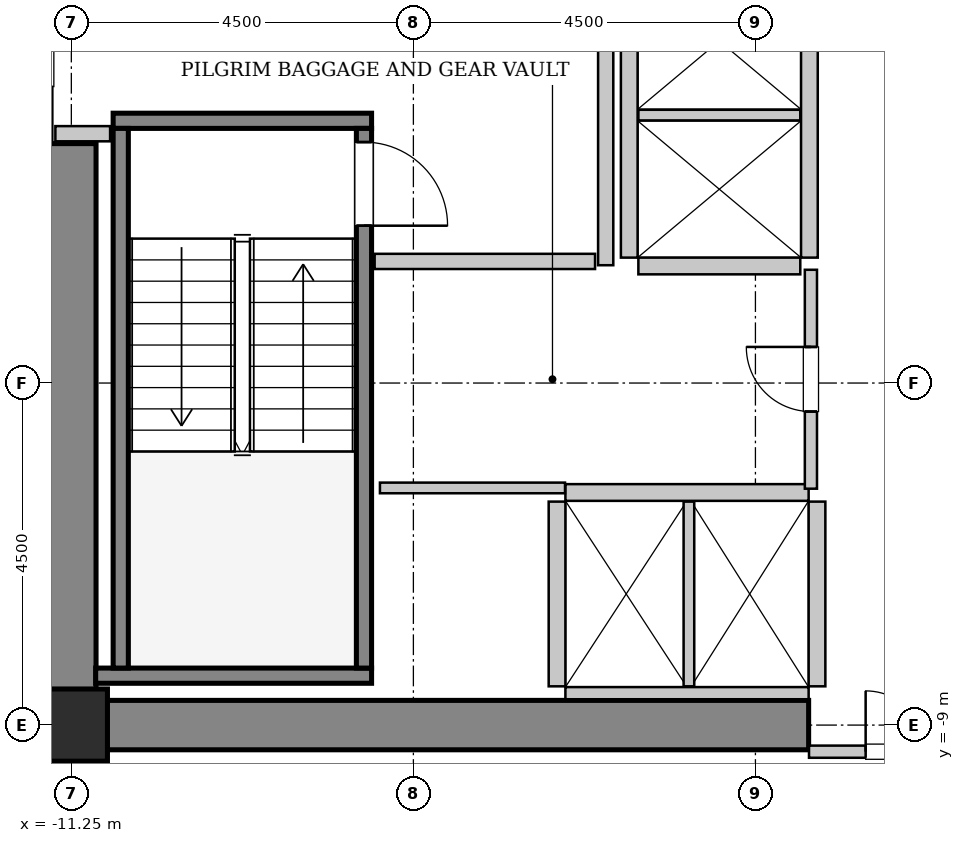
"""IFC4 building model, lengths in metres.
Left out: names, types, materials, properties, quantities, classifications, styles, units other than length and angle.
Written with IfcOpenShell. Run it as: python <this file> out.ifc"""

import sys

from ifc_helpers import new_model, si_unit, direction, frame, frame_2d, origin, origin_2d, place, context, subcontext, project, spatial, rectangle, hollow_rectangle, extrude, source, transform, mapped, element, fill, save


model = new_model("IFC4")
c1 = context("Model", 3, precision=1e-05, world=origin(), true_north=direction((0.0, 1.0)))
c2 = subcontext(c1, "Body", "Model", "MODEL_VIEW")
j1 = project(units=[si_unit("LENGTHUNIT", "METRE"), si_unit("PLANEANGLEUNIT", "RADIAN")], contexts=[c1])
p1 = place(None, origin())
s1 = spatial("IfcSite", under=j1, at=p1, CompositionType="ELEMENT")
p2 = place(p1, origin())
s2 = spatial("IfcBuilding", under=s1, at=p2, CompositionType="ELEMENT")
p3 = place(p2, frame((0.0, 0.0, 63.4)))
s3 = spatial("IfcBuildingStorey", under=s2, at=p3, CompositionType="ELEMENT", Elevation=63.4)
m1 = source(origin(), c2, "Body", "SweptSolid", [
    extrude(rectangle(XDim=10.025, YDim=0.65, at=frame_2d((5.012, 0.0))), origin(), (0.0, 0.0, 1.0), 3.8),
])
p4 = place(p3, frame((-11.575, -9.0, 0.0), z_axis=(0.0, 0.0, 1.0), x_axis=(1.0, 0.0, 0.0)))
e1 = element("IfcWall", 1, at=p4, inside=s3, PredefinedType="SHEAR", context=c2, shape_type="MappedRepresentation", body=[
    mapped(m1, transform((0.0, 0.0, 0.0), x_axis=(1.0, 0.0, 0.0), y_axis=(0.0, 1.0, 0.0), z_axis=(0.0, 0.0, 1.0), scale=1.0)),
])
m2 = source(origin(), c2, "Body", "SweptSolid", [
    extrude(rectangle(XDim=7.325, YDim=0.65, at=frame_2d((3.663, 0.0))), origin(), (0.0, 0.0, 1.0), 3.8),
])
p5 = place(p3, frame((-11.25, -8.675, 0.0), z_axis=(0.0, 0.0, 1.0), x_axis=(0.0, 1.0, 0.0)))
e2 = element("IfcWall", 2, at=p5, inside=s3, PredefinedType="SHEAR", context=c2, shape_type="MappedRepresentation", body=[
    mapped(m2, transform((0.0, 0.0, 0.0), x_axis=(1.0, 0.0, 0.0), y_axis=(0.0, 1.0, 0.0), z_axis=(0.0, 0.0, 1.0), scale=1.0)),
])
m3 = source(origin(), c2, "Body", "SweptSolid", [
    extrude(hollow_rectangle(XDim=0.95, YDim=0.95, WallThickness=0.045, InnerFilletRadius=0.045, OuterFilletRadius=0.09, at=origin_2d()), origin(), (0.0, 0.0, 1.0), 3.8),
])
p6 = place(p3, frame((-11.25, -9.0, 0.0), z_axis=(0.0, 0.0, 1.0), x_axis=(1.0, 0.0, 0.0)))
e3 = element("IfcColumn", 3, at=p6, inside=s3, PredefinedType="COLUMN", context=c2, shape_type="MappedRepresentation", body=[
    mapped(m3, transform((0.0, 0.0, 0.0), x_axis=(1.0, 0.0, 0.0), y_axis=(0.0, 1.0, 0.0), z_axis=(0.0, 0.0, 1.0), scale=1.0)),
])
m4 = source(origin(), c2, "Body", "SweptSolid", [
    extrude(rectangle(XDim=3.4, YDim=0.2, at=frame_2d((1.7, 0.0))), origin(), (0.0, 0.0, 1.0), 3.8),
])
p7 = place(p3, frame((-10.7, -1.05, 0.0), z_axis=(0.0, 0.0, 1.0), x_axis=(1.0, 0.0, 0.0)))
e4 = element("IfcWall", 4, at=p7, inside=s3, PredefinedType="SOLIDWALL", context=c2, shape_type="MappedRepresentation", body=[
    mapped(m4, transform((0.0, 0.0, 0.0), x_axis=(1.0, 0.0, 0.0), y_axis=(0.0, 1.0, 0.0), z_axis=(0.0, 0.0, 1.0), scale=1.0)),
])
m5 = source(origin(), c2, "Body", "SweptSolid", [
    extrude(rectangle(XDim=3.63, YDim=0.2, at=frame_2d((1.815, 0.0))), origin(), (0.0, 0.0, 1.0), 3.8),
])
p8 = place(p3, frame((-10.93, -8.35, 0.0), z_axis=(0.0, 0.0, 1.0), x_axis=(1.0, 0.0, 0.0)))
e5 = element("IfcWall", 5, at=p8, inside=s3, PredefinedType="SOLIDWALL", context=c2, shape_type="MappedRepresentation", body=[
    mapped(m5, transform((0.0, 0.0, 0.0), x_axis=(1.0, 0.0, 0.0), y_axis=(0.0, 1.0, 0.0), z_axis=(0.0, 0.0, 1.0), scale=1.0)),
])
m6 = source(origin(), c2, "Body", "SweptSolid", [
    extrude(rectangle(XDim=7.1, YDim=0.2, at=frame_2d((3.55, 0.0))), origin(), (0.0, 0.0, 1.0), 3.8),
])
p9 = place(p3, frame((-10.6, -1.15, 0.0), z_axis=(0.0, 0.0, 1.0), x_axis=(0.0, -1.0, 0.0)))
e6 = element("IfcWall", 6, at=p9, inside=s3, PredefinedType="SOLIDWALL", context=c2, shape_type="MappedRepresentation", body=[
    mapped(m6, transform((0.0, 0.0, 0.0), x_axis=(1.0, 0.0, 0.0), y_axis=(0.0, 1.0, 0.0), z_axis=(0.0, 0.0, 1.0), scale=1.0)),
])
p10 = place(p3, frame((-7.4, -1.15, 0.0), z_axis=(0.0, 0.0, 1.0), x_axis=(0.0, -1.0, 0.0)))
e7 = element("IfcWall", 7, at=p10, inside=s3, PredefinedType="SOLIDWALL", context=c2, shape_type="MappedRepresentation", body=[
    mapped(m6, transform((0.0, 0.0, 0.0), x_axis=(1.0, 0.0, 0.0), y_axis=(0.0, 1.0, 0.0), z_axis=(0.0, 0.0, 1.0), scale=1.0)),
])
p11 = place(p10, frame((0.18, 0.0, 0.0)))
e8 = element("IfcOpeningElement", 8, at=p11, cuts=e7, PredefinedType="OPENING", context=c2, shape_type="SweptSolid", body=[
    extrude(rectangle(XDim=1.1, YDim=2.15, at=frame_2d((0.55, 1.075))), frame((0.0, 0.11, 0.0), z_axis=(0.0, -1.0, 0.0), x_axis=(1.0, 0.0, 0.0)), (0.0, 0.0, 1.0), 0.22),
])
m7 = source(origin(), c2, "Body", "SweptSolid", [
    extrude(rectangle(XDim=3.2, YDim=0.22, at=frame_2d((1.6, 0.0))), origin(), (0.0, 0.0, 1.0), 3.535),
])
p12 = place(p3, frame((-1.55, -5.94, 0.0), z_axis=(0.0, 0.0, 1.0), x_axis=(-1.0, 0.0, 0.0)))
e9 = element("IfcWall", 9, at=p12, inside=s3, PredefinedType="SOLIDWALL", context=c2, shape_type="MappedRepresentation", body=[
    mapped(m7, transform((0.0, 0.0, 0.0), x_axis=(1.0, 0.0, 0.0), y_axis=(0.0, 1.0, 0.0), z_axis=(0.0, 0.0, 1.0), scale=1.0)),
])
m8 = source(origin(), c2, "Body", "SweptSolid", [
    extrude(rectangle(XDim=3.2, YDim=0.16, at=frame_2d((1.6, 0.0))), origin(), (0.0, 0.0, 1.0), 2.425),
])
p13 = place(p3, frame((-4.75, -8.58, 0.0), z_axis=(0.0, 0.0, 1.0), x_axis=(1.0, 0.0, 0.0)))
e10 = element("IfcWall", 10, at=p13, inside=s3, PredefinedType="PARTITIONING", context=c2, shape_type="MappedRepresentation", body=[
    mapped(m8, transform((0.0, 0.0, 0.0), x_axis=(1.0, 0.0, 0.0), y_axis=(0.0, 1.0, 0.0), z_axis=(0.0, 0.0, 1.0), scale=1.0)),
])
m9 = source(origin(), c2, "Body", "SweptSolid", [
    extrude(rectangle(XDim=2.43, YDim=0.22, at=frame_2d((1.215, 0.0))), origin(), (0.0, 0.0, 1.0), 3.535),
])
p14 = place(p3, frame((-4.86, -6.06, 0.0), z_axis=(0.0, 0.0, 1.0), x_axis=(0.0, -1.0, 0.0)))
e11 = element("IfcWall", 11, at=p14, inside=s3, PredefinedType="SOLIDWALL", context=c2, shape_type="MappedRepresentation", body=[
    mapped(m9, transform((0.0, 0.0, 0.0), x_axis=(1.0, 0.0, 0.0), y_axis=(0.0, 1.0, 0.0), z_axis=(0.0, 0.0, 1.0), scale=1.0)),
])
m10 = source(origin(), c2, "Body", "SweptSolid", [
    extrude(rectangle(XDim=2.43, YDim=0.14, at=frame_2d((1.215, 0.0))), origin(), (0.0, 0.0, 1.0), 3.535),
])
p15 = place(p3, frame((-3.125, -8.49, 0.0), z_axis=(0.0, 0.0, 1.0), x_axis=(0.0, 1.0, 0.0)))
e12 = element("IfcWall", 12, at=p15, inside=s3, PredefinedType="PARTITIONING", context=c2, shape_type="MappedRepresentation", body=[
    mapped(m10, transform((0.0, 0.0, 0.0), x_axis=(1.0, 0.0, 0.0), y_axis=(0.0, 1.0, 0.0), z_axis=(0.0, 0.0, 1.0), scale=1.0)),
])
p16 = place(p3, frame((-1.44, -8.49, 0.0), z_axis=(0.0, 0.0, 1.0), x_axis=(0.0, 1.0, 0.0)))
e13 = element("IfcWall", 13, at=p16, inside=s3, PredefinedType="SOLIDWALL", context=c2, shape_type="MappedRepresentation", body=[
    mapped(m9, transform((0.0, 0.0, 0.0), x_axis=(1.0, 0.0, 0.0), y_axis=(0.0, 1.0, 0.0), z_axis=(0.0, 0.0, 1.0), scale=1.0)),
])
m11 = source(origin(), c2, "Body", "SweptSolid", [
    extrude(rectangle(XDim=5.7, YDim=0.22, at=frame_2d((2.85, 0.0))), origin(), (0.0, 0.0, 1.0), 3.535),
])
for number, where, z_axis, x_axis in (
    (14, (-1.54, -2.85, 0.0), (0.0, 0.0, 1.0), (0.0, 1.0, 0.0)),
    (15, (-3.91, 2.85, 0.0), (0.0, 0.0, 1.0), (0.0, -1.0, 0.0)),
):
    element("IfcWall", number, at=place(p3, frame(where, z_axis=z_axis, x_axis=x_axis)), inside=s3, PredefinedType="SOLIDWALL", context=c2, shape_type="MappedRepresentation", body=[
        mapped(m11, transform((0.0, 0.0, 0.0), x_axis=(1.0, 0.0, 0.0), y_axis=(0.0, 1.0, 0.0), z_axis=(0.0, 0.0, 1.0), scale=1.0)),
    ])
m12 = source(origin(), c2, "Body", "SweptSolid", [
    extrude(rectangle(XDim=2.13, YDim=0.22, at=frame_2d((1.065, 0.0))), origin(), (0.0, 0.0, 1.0), 3.535),
])
p17 = place(p3, frame((-3.79, -2.96, 0.0), z_axis=(0.0, 0.0, 1.0), x_axis=(1.0, 0.0, 0.0)))
e16 = element("IfcWall", 16, at=p17, inside=s3, PredefinedType="SOLIDWALL", context=c2, shape_type="MappedRepresentation", body=[
    mapped(m12, transform((0.0, 0.0, 0.0), x_axis=(1.0, 0.0, 0.0), y_axis=(0.0, 1.0, 0.0), z_axis=(0.0, 0.0, 1.0), scale=1.0)),
])
m13 = source(origin(), c2, "Body", "SweptSolid", [
    extrude(rectangle(XDim=2.13, YDim=0.14, at=frame_2d((1.065, 0.0))), origin(), (0.0, 0.0, 1.0), 3.535),
])
p18 = place(p3, frame((-3.79, -0.975, 0.0), z_axis=(0.0, 0.0, 1.0), x_axis=(1.0, 0.0, 0.0)))
e17 = element("IfcWall", 17, at=p18, inside=s3, PredefinedType="PARTITIONING", context=c2, shape_type="MappedRepresentation", body=[
    mapped(m13, transform((0.0, 0.0, 0.0), x_axis=(1.0, 0.0, 0.0), y_axis=(0.0, 1.0, 0.0), z_axis=(0.0, 0.0, 1.0), scale=1.0)),
])
m14 = source(origin(), c2, "Body", "SweptSolid", [
    extrude(rectangle(XDim=5.9, YDim=0.2, at=frame_2d((2.95, 0.0))), origin(), (0.0, 0.0, 1.0), 3.535),
])
p19 = place(p3, frame((-4.22, -2.95, 0.0), z_axis=(0.0, 0.0, 1.0), x_axis=(0.0, 1.0, 0.0)))
e18 = element("IfcWall", 18, at=p19, inside=s3, PredefinedType="PARTITIONING", context=c2, shape_type="MappedRepresentation", body=[
    mapped(m14, transform((0.0, 0.0, 0.0), x_axis=(1.0, 0.0, 0.0), y_axis=(0.0, 1.0, 0.0), z_axis=(0.0, 0.0, 1.0), scale=1.0)),
])
m15 = source(origin(), c2, "Body", "SweptSolid", [
    extrude(rectangle(XDim=2.9, YDim=0.2, at=frame_2d((1.45, 0.0))), origin(), (0.0, 0.0, 1.0), 3.535),
])
p20 = place(p3, frame((-7.26, -2.9, 0.0), z_axis=(0.0, 0.0, 1.0), x_axis=(1.0, 0.0, 0.0)))
e19 = element("IfcWall", 19, at=p20, inside=s3, PredefinedType="PARTITIONING", context=c2, shape_type="MappedRepresentation", body=[
    mapped(m15, transform((0.0, 0.0, 0.0), x_axis=(1.0, 0.0, 0.0), y_axis=(0.0, 1.0, 0.0), z_axis=(0.0, 0.0, 1.0), scale=1.0)),
])
m16 = source(origin(), c2, "Body", "SweptSolid", [
    extrude(rectangle(XDim=0.72, YDim=0.2, at=frame_2d((0.36, 0.0))), origin(), (0.0, 0.0, 1.0), 3.535),
])
p21 = place(p3, frame((-11.46, -1.22, 0.0), z_axis=(0.0, 0.0, 1.0), x_axis=(1.0, 0.0, 0.0)))
e20 = element("IfcWall", 20, at=p21, inside=s3, PredefinedType="PARTITIONING", context=c2, shape_type="MappedRepresentation", body=[
    mapped(m16, transform((0.0, 0.0, 0.0), x_axis=(1.0, 0.0, 0.0), y_axis=(0.0, 1.0, 0.0), z_axis=(0.0, 0.0, 1.0), scale=1.0)),
])
m17 = source(origin(), c2, "Body", "SweptSolid", [
    extrude(rectangle(XDim=3.09, YDim=0.16, at=frame_2d((1.545, 0.0))), origin(), (0.0, 0.0, 1.0), 2.425),
])
p22 = place(p3, frame((-1.545, -9.35, 0.0), z_axis=(0.0, 0.0, 1.0), x_axis=(1.0, 0.0, 0.0)))
e21 = element("IfcWall", 21, at=p22, inside=s3, PredefinedType="PARTITIONING", context=c2, shape_type="MappedRepresentation", body=[
    mapped(m17, transform((0.0, 0.0, 0.0), x_axis=(1.0, 0.0, 0.0), y_axis=(0.0, 1.0, 0.0), z_axis=(0.0, 0.0, 1.0), scale=1.0)),
])
p23 = place(p22, frame((0.745, 0.0, 0.0)))
e22 = element("IfcOpeningElement", 22, at=p23, cuts=e21, PredefinedType="OPENING", context=c2, shape_type="SweptSolid", body=[
    extrude(rectangle(XDim=1.6, YDim=2.3, at=frame_2d((0.8, 1.15))), frame((0.0, 0.09, 0.0), z_axis=(0.0, -1.0, 0.0), x_axis=(1.0, 0.0, 0.0)), (0.0, 0.0, 1.0), 0.18),
])
m18 = source(origin(), c2, "Body", "SweptSolid", [
    extrude(rectangle(XDim=2.88, YDim=0.16, at=frame_2d((1.44, 0.0))), origin(), (0.0, 0.0, 1.0), 3.535),
])
p24 = place(p3, frame((-1.52, -5.89, 0.0), z_axis=(0.0, 0.0, 1.0), x_axis=(0.0, 1.0, 0.0)))
e23 = element("IfcWall", 23, at=p24, inside=s3, PredefinedType="PARTITIONING", context=c2, shape_type="MappedRepresentation", body=[
    mapped(m18, transform((0.0, 0.0, 0.0), x_axis=(1.0, 0.0, 0.0), y_axis=(0.0, 1.0, 0.0), z_axis=(0.0, 0.0, 1.0), scale=1.0)),
])
p25 = place(p24, frame((1.015, 0.0, 0.0)))
e24 = element("IfcOpeningElement", 24, at=p25, cuts=e23, PredefinedType="OPENING", context=c2, shape_type="SweptSolid", body=[
    extrude(rectangle(XDim=0.85, YDim=2.1, at=frame_2d((0.425, 1.05))), frame((0.0, 0.09, 0.0), z_axis=(0.0, -1.0, 0.0), x_axis=(1.0, 0.0, 0.0)), (0.0, 0.0, 1.0), 0.18),
])
m19 = source(origin(), c2, "Body", "SweptSolid", [
    extrude(rectangle(XDim=2.435, YDim=0.14, at=frame_2d((1.218, 0.0))), origin(), (0.0, 0.0, 1.0), 3.535),
])
p26 = place(p3, frame((-7.19, -5.88, 0.0), z_axis=(0.0, 0.0, 1.0), x_axis=(1.0, 0.0, 0.0)))
e25 = element("IfcWall", 25, at=p26, inside=s3, PredefinedType="PARTITIONING", context=c2, shape_type="MappedRepresentation", body=[
    mapped(m19, transform((0.0, 0.0, 0.0), x_axis=(1.0, 0.0, 0.0), y_axis=(0.0, 1.0, 0.0), z_axis=(0.0, 0.0, 1.0), scale=1.0)),
])
m20 = source(origin(), c2, "Body", "SweptSolid", [
    extrude(rectangle(XDim=1.1, YDim=2.15, at=frame_2d((0.55, 1.075))), frame((0.0, 0.025, 0.0), z_axis=(0.0, -1.0, 0.0), x_axis=(1.0, 0.0, 0.0)), (0.0, 0.0, 1.0), 0.05),
])
p27 = place(p11, origin())
e26 = element("IfcDoor", 26, at=p27, inside=s3, OperationType="SINGLE_SWING_RIGHT", PredefinedType="DOOR", context=c2, shape_type="MappedRepresentation", body=[
    mapped(m20, transform((0.0, 0.0, 0.0), x_axis=(1.0, 0.0, 0.0), y_axis=(0.0, 1.0, 0.0), z_axis=(0.0, 0.0, 1.0), scale=1.0)),
])
fill(e8, e26)
m21 = source(origin(), c2, "Body", "SweptSolid", [
    extrude(rectangle(XDim=1.6, YDim=2.3, at=frame_2d((0.8, 1.15))), frame((0.0, 0.025, 0.0), z_axis=(0.0, -1.0, 0.0), x_axis=(1.0, 0.0, 0.0)), (0.0, 0.0, 1.0), 0.05),
])
p28 = place(p23, origin())
e27 = element("IfcDoor", 27, at=p28, inside=s3, OperationType="DOUBLE_DOOR_SINGLE_SWING", PredefinedType="DOOR", context=c2, shape_type="MappedRepresentation", body=[
    mapped(m21, transform((0.0, 0.0, 0.0), x_axis=(1.0, 0.0, 0.0), y_axis=(0.0, 1.0, 0.0), z_axis=(0.0, 0.0, 1.0), scale=1.0)),
])
fill(e22, e27)
m22 = source(origin(), c2, "Body", "SweptSolid", [
    extrude(rectangle(XDim=0.85, YDim=2.1, at=frame_2d((0.425, 1.05))), frame((0.0, 0.025, 0.0), z_axis=(0.0, -1.0, 0.0), x_axis=(1.0, 0.0, 0.0)), (0.0, 0.0, 1.0), 0.05),
])
p29 = place(p25, origin())
e28 = element("IfcDoor", 28, at=p29, inside=s3, OperationType="SINGLE_SWING_RIGHT", PredefinedType="DOOR", context=c2, shape_type="MappedRepresentation", body=[
    mapped(m22, transform((0.0, 0.0, 0.0), x_axis=(1.0, 0.0, 0.0), y_axis=(0.0, 1.0, 0.0), z_axis=(0.0, 0.0, 1.0), scale=1.0)),
])
fill(e24, e28)
save(model, sys.argv[1])
